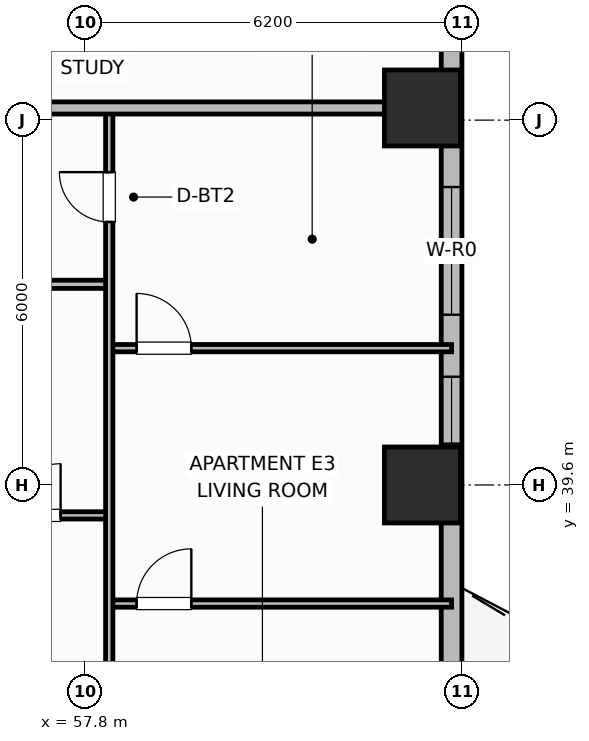
"""IFC4 building model, lengths in metres.
Left out: names, types, materials, properties, quantities, classifications, styles, units other than length and angle.
Written with IfcOpenShell. Run it as: python <this file> out.ifc"""

import sys

from ifc_helpers import new_model, si_unit, direction, frame, frame_2d, origin, origin_2d, place, context, subcontext, project, spatial, rectangle, extrude, element, fill, save


model = new_model("IFC4")
c1 = context("Model", 3, precision=1e-05, world=origin(), true_north=direction((0.0, 1.0)))
c2 = subcontext(c1, "Body", "Model", "MODEL_VIEW")
j1 = project(units=[si_unit("LENGTHUNIT", "METRE"), si_unit("PLANEANGLEUNIT", "RADIAN")], contexts=[c1])
p1 = place(None, origin())
s1 = spatial("IfcSite", under=j1, at=p1, CompositionType="ELEMENT")
p2 = place(p1, origin())
s2 = spatial("IfcBuilding", under=s1, at=p2, CompositionType="ELEMENT")
p3 = place(p2, frame((0.0, 0.0, 69.5)))
s3 = spatial("IfcBuildingStorey", under=s2, at=p3, CompositionType="ELEMENT", Elevation=69.5)
for number, where, z_axis, x_axis in (
    (1, (63.35, 39.6, 0.0), (0.0, 0.0, 1.0), (1.0, 0.0, 0.0)),
    (2, (63.35, 45.8, 0.0), (0.0, 0.0, 1.0), (1.0, 0.0, 0.0)),
):
    element("IfcColumn", number, at=place(p3, frame(where, z_axis=z_axis, x_axis=x_axis)), inside=s3, PredefinedType="COLUMN", context=c2, shape_type="SweptSolid", body=[
        extrude(rectangle(XDim=1.25, YDim=1.25, at=origin_2d()), origin(), (0.0, 0.0, 1.0), 3.7),
    ])
p4 = place(p3, frame((63.83, 32.6, 0.0), z_axis=(0.0, 0.0, 1.0), x_axis=(0.0, 1.0, 0.0)))
e3 = element("IfcWall", 3, at=p4, inside=s3, PredefinedType="SOLIDWALL", context=c2, shape_type="SweptSolid", body=[
    extrude(rectangle(XDim=14.8, YDim=0.34, at=frame_2d((7.4, 0.0))), origin(), (0.0, 0.0, 1.0), 2.7),
])
p5 = place(p4, frame((2.1, 0.0, 0.0)))
e4 = element("IfcOpeningElement", 4, at=p5, cuts=e3, PredefinedType="OPENING", context=c2, shape_type="SweptSolid", body=[
    extrude(rectangle(XDim=1.6, YDim=2.1, at=frame_2d((0.8, 1.05))), frame((0.0, 0.18, 0.0), z_axis=(0.0, -1.0, 0.0), x_axis=(1.0, 0.0, 0.0)), (0.0, 0.0, 1.0), 0.36),
])
p6 = place(p4, frame((7.68, 0.0, 0.89)))
e5 = element("IfcOpeningElement", 5, at=p6, cuts=e3, PredefinedType="OPENING", context=c2, shape_type="SweptSolid", body=[
    extrude(rectangle(XDim=1.1, YDim=1.65, at=frame_2d((0.55, 0.825))), frame((0.0, 0.18, 0.0), z_axis=(0.0, -1.0, 0.0), x_axis=(1.0, 0.0, 0.0)), (0.0, 0.0, 1.0), 0.36),
])
p7 = place(p4, frame((9.8, 0.0, 0.68)))
e6 = element("IfcOpeningElement", 6, at=p7, cuts=e3, PredefinedType="OPENING", context=c2, shape_type="SweptSolid", body=[
    extrude(rectangle(XDim=2.1, YDim=1.9, at=frame_2d((1.05, 0.95))), frame((0.0, 0.18, 0.0), z_axis=(0.0, -1.0, 0.0), x_axis=(1.0, 0.0, 0.0)), (0.0, 0.0, 1.0), 0.36),
])
p8 = place(p3, frame((55.95, 39.1, 0.0), z_axis=(0.0, 0.0, 1.0), x_axis=(1.0, 0.0, 0.0)))
e7 = element("IfcWall", 7, at=p8, inside=s3, PredefinedType="PARTITIONING", context=c2, shape_type="SweptSolid", body=[
    extrude(rectangle(XDim=2.25, YDim=0.12, at=frame_2d((1.125, 0.0))), origin(), (0.0, 0.0, 1.0), 2.53),
])
p9 = place(p8, frame((0.6, 0.0, 0.0)))
e8 = element("IfcOpeningElement", 8, at=p9, cuts=e7, PredefinedType="OPENING", context=c2, shape_type="SweptSolid", body=[
    extrude(rectangle(XDim=0.85, YDim=2.1, at=frame_2d((0.425, 1.05))), frame((0.0, 0.07, 0.0), z_axis=(0.0, -1.0, 0.0), x_axis=(1.0, 0.0, 0.0)), (0.0, 0.0, 1.0), 0.14),
])
p10 = place(p3, frame((55.95, 42.9, 0.0), z_axis=(0.0, 0.0, 1.0), x_axis=(1.0, 0.0, 0.0)))
e9 = element("IfcWall", 9, at=p10, inside=s3, PredefinedType="PARTITIONING", context=c2, shape_type="SweptSolid", body=[
    extrude(rectangle(XDim=2.25, YDim=0.135, at=frame_2d((1.125, 0.0))), origin(), (0.0, 0.0, 1.0), 2.53),
])
p11 = place(p3, frame((58.2, 37.65, 0.0), z_axis=(0.0, 0.0, 1.0), x_axis=(1.0, 0.0, 0.0)))
e10 = element("IfcWall", 10, at=p11, inside=s3, PredefinedType="PARTITIONING", context=c2, shape_type="SweptSolid", body=[
    extrude(rectangle(XDim=5.63, YDim=0.12, at=frame_2d((2.815, 0.0))), origin(), (0.0, 0.0, 1.0), 2.53),
])
p12 = place(p11, frame((0.45, 0.0, 0.0)))
e11 = element("IfcOpeningElement", 11, at=p12, cuts=e10, PredefinedType="OPENING", context=c2, shape_type="SweptSolid", body=[
    extrude(rectangle(XDim=0.9, YDim=2.1, at=frame_2d((0.45, 1.05))), frame((0.0, 0.07, 0.0), z_axis=(0.0, -1.0, 0.0), x_axis=(1.0, 0.0, 0.0)), (0.0, 0.0, 1.0), 0.14),
])
p13 = place(p3, frame((58.2, 41.85, 0.0), z_axis=(0.0, 0.0, 1.0), x_axis=(1.0, 0.0, 0.0)))
e12 = element("IfcWall", 12, at=p13, inside=s3, PredefinedType="PARTITIONING", context=c2, shape_type="SweptSolid", body=[
    extrude(rectangle(XDim=5.63, YDim=0.12, at=frame_2d((2.815, 0.0))), origin(), (0.0, 0.0, 1.0), 2.53),
])
p14 = place(p13, frame((0.45, 0.0, 0.0)))
e13 = element("IfcOpeningElement", 13, at=p14, cuts=e12, PredefinedType="OPENING", context=c2, shape_type="SweptSolid", body=[
    extrude(rectangle(XDim=0.9, YDim=2.1, at=frame_2d((0.45, 1.05))), frame((0.0, 0.07, 0.0), z_axis=(0.0, -1.0, 0.0), x_axis=(1.0, 0.0, 0.0)), (0.0, 0.0, 1.0), 0.14),
])
p15 = place(p3, frame((58.2, 33.74, 0.0), z_axis=(0.0, 0.0, 1.0), x_axis=(0.0, 1.0, 0.0)))
e14 = element("IfcWall", 14, at=p15, inside=s3, PredefinedType="PARTITIONING", context=c2, shape_type="SweptSolid", body=[
    extrude(rectangle(XDim=12.02, YDim=0.12, at=frame_2d((6.01, 0.0))), origin(), (0.0, 0.0, 1.0), 2.53),
])
p16 = place(p15, frame((0.41, 0.0, 0.0)))
e15 = element("IfcOpeningElement", 15, at=p16, cuts=e14, PredefinedType="OPENING", context=c2, shape_type="SweptSolid", body=[
    extrude(rectangle(XDim=0.9, YDim=2.1, at=frame_2d((0.45, 1.05))), frame((0.0, 0.07, 0.0), z_axis=(0.0, -1.0, 0.0), x_axis=(1.0, 0.0, 0.0)), (0.0, 0.0, 1.0), 0.14),
])
p17 = place(p15, frame((10.185, 0.0, 0.0)))
e16 = element("IfcOpeningElement", 16, at=p17, cuts=e14, PredefinedType="OPENING", context=c2, shape_type="SweptSolid", body=[
    extrude(rectangle(XDim=0.82, YDim=2.08, at=frame_2d((0.41, 1.04))), frame((0.0, 0.07, 0.0), z_axis=(0.0, -1.0, 0.0), x_axis=(1.0, 0.0, 0.0)), (0.0, 0.0, 1.0), 0.14),
])
p18 = place(p3, frame((55.95, 45.8, 0.0), z_axis=(0.0, 0.0, 1.0), x_axis=(1.0, 0.0, 0.0)))
e17 = element("IfcWall", 17, at=p18, inside=s3, PredefinedType="PARTITIONING", context=c2, shape_type="SweptSolid", body=[
    extrude(rectangle(XDim=7.46, YDim=0.2, at=frame_2d((3.73, 0.0))), origin(), (0.0, 0.0, 1.0), 2.53),
])
p19 = place(p6, origin())
e18 = element("IfcWindow", 18, at=p19, inside=s3, PartitioningType="SINGLE_PANEL", PredefinedType="WINDOW", context=c2, shape_type="SweptSolid", body=[
    extrude(rectangle(XDim=1.1, YDim=1.65, at=frame_2d((0.55, 0.825))), frame((0.0, 0.03, 0.0), z_axis=(0.0, -1.0, 0.0), x_axis=(1.0, 0.0, 0.0)), (0.0, 0.0, 1.0), 0.06),
])
fill(e5, e18)
p20 = place(p7, origin())
e19 = element("IfcWindow", 19, at=p20, inside=s3, PartitioningType="SINGLE_PANEL", PredefinedType="WINDOW", context=c2, shape_type="SweptSolid", body=[
    extrude(rectangle(XDim=2.1, YDim=1.9, at=frame_2d((1.05, 0.95))), frame((0.0, 0.03, 0.0), z_axis=(0.0, -1.0, 0.0), x_axis=(1.0, 0.0, 0.0)), (0.0, 0.0, 1.0), 0.06),
])
fill(e6, e19)
p21 = place(p9, origin())
e20 = element("IfcDoor", 20, at=p21, inside=s3, OperationType="SINGLE_SWING_RIGHT", PredefinedType="DOOR", context=c2, shape_type="SweptSolid", body=[
    extrude(rectangle(XDim=0.85, YDim=2.1, at=frame_2d((0.425, 1.05))), frame((0.0, 0.025, 0.0), z_axis=(0.0, -1.0, 0.0), x_axis=(1.0, 0.0, 0.0)), (0.0, 0.0, 1.0), 0.05),
])
fill(e8, e20)
p22 = place(p12, origin())
e21 = element("IfcDoor", 21, at=p22, inside=s3, OperationType="SINGLE_SWING_RIGHT", PredefinedType="DOOR", context=c2, shape_type="SweptSolid", body=[
    extrude(rectangle(XDim=0.9, YDim=2.1, at=frame_2d((0.45, 1.05))), frame((0.0, 0.025, 0.0), z_axis=(0.0, -1.0, 0.0), x_axis=(1.0, 0.0, 0.0)), (0.0, 0.0, 1.0), 0.05),
])
fill(e11, e21)
p23 = place(p14, origin())
e22 = element("IfcDoor", 22, at=p23, inside=s3, OperationType="SINGLE_SWING_LEFT", PredefinedType="DOOR", context=c2, shape_type="SweptSolid", body=[
    extrude(rectangle(XDim=0.9, YDim=2.1, at=frame_2d((0.45, 1.05))), frame((0.0, 0.025, 0.0), z_axis=(0.0, -1.0, 0.0), x_axis=(1.0, 0.0, 0.0)), (0.0, 0.0, 1.0), 0.05),
])
fill(e13, e22)
p24 = place(p17, origin())
e23 = element("IfcDoor", 23, at=p24, inside=s3, OperationType="SINGLE_SWING_RIGHT", PredefinedType="DOOR", context=c2, shape_type="SweptSolid", body=[
    extrude(rectangle(XDim=0.82, YDim=2.08, at=frame_2d((0.41, 1.04))), frame((0.0, 0.025, 0.0), z_axis=(0.0, -1.0, 0.0), x_axis=(1.0, 0.0, 0.0)), (0.0, 0.0, 1.0), 0.05),
])
fill(e16, e23)
save(model, sys.argv[1])
